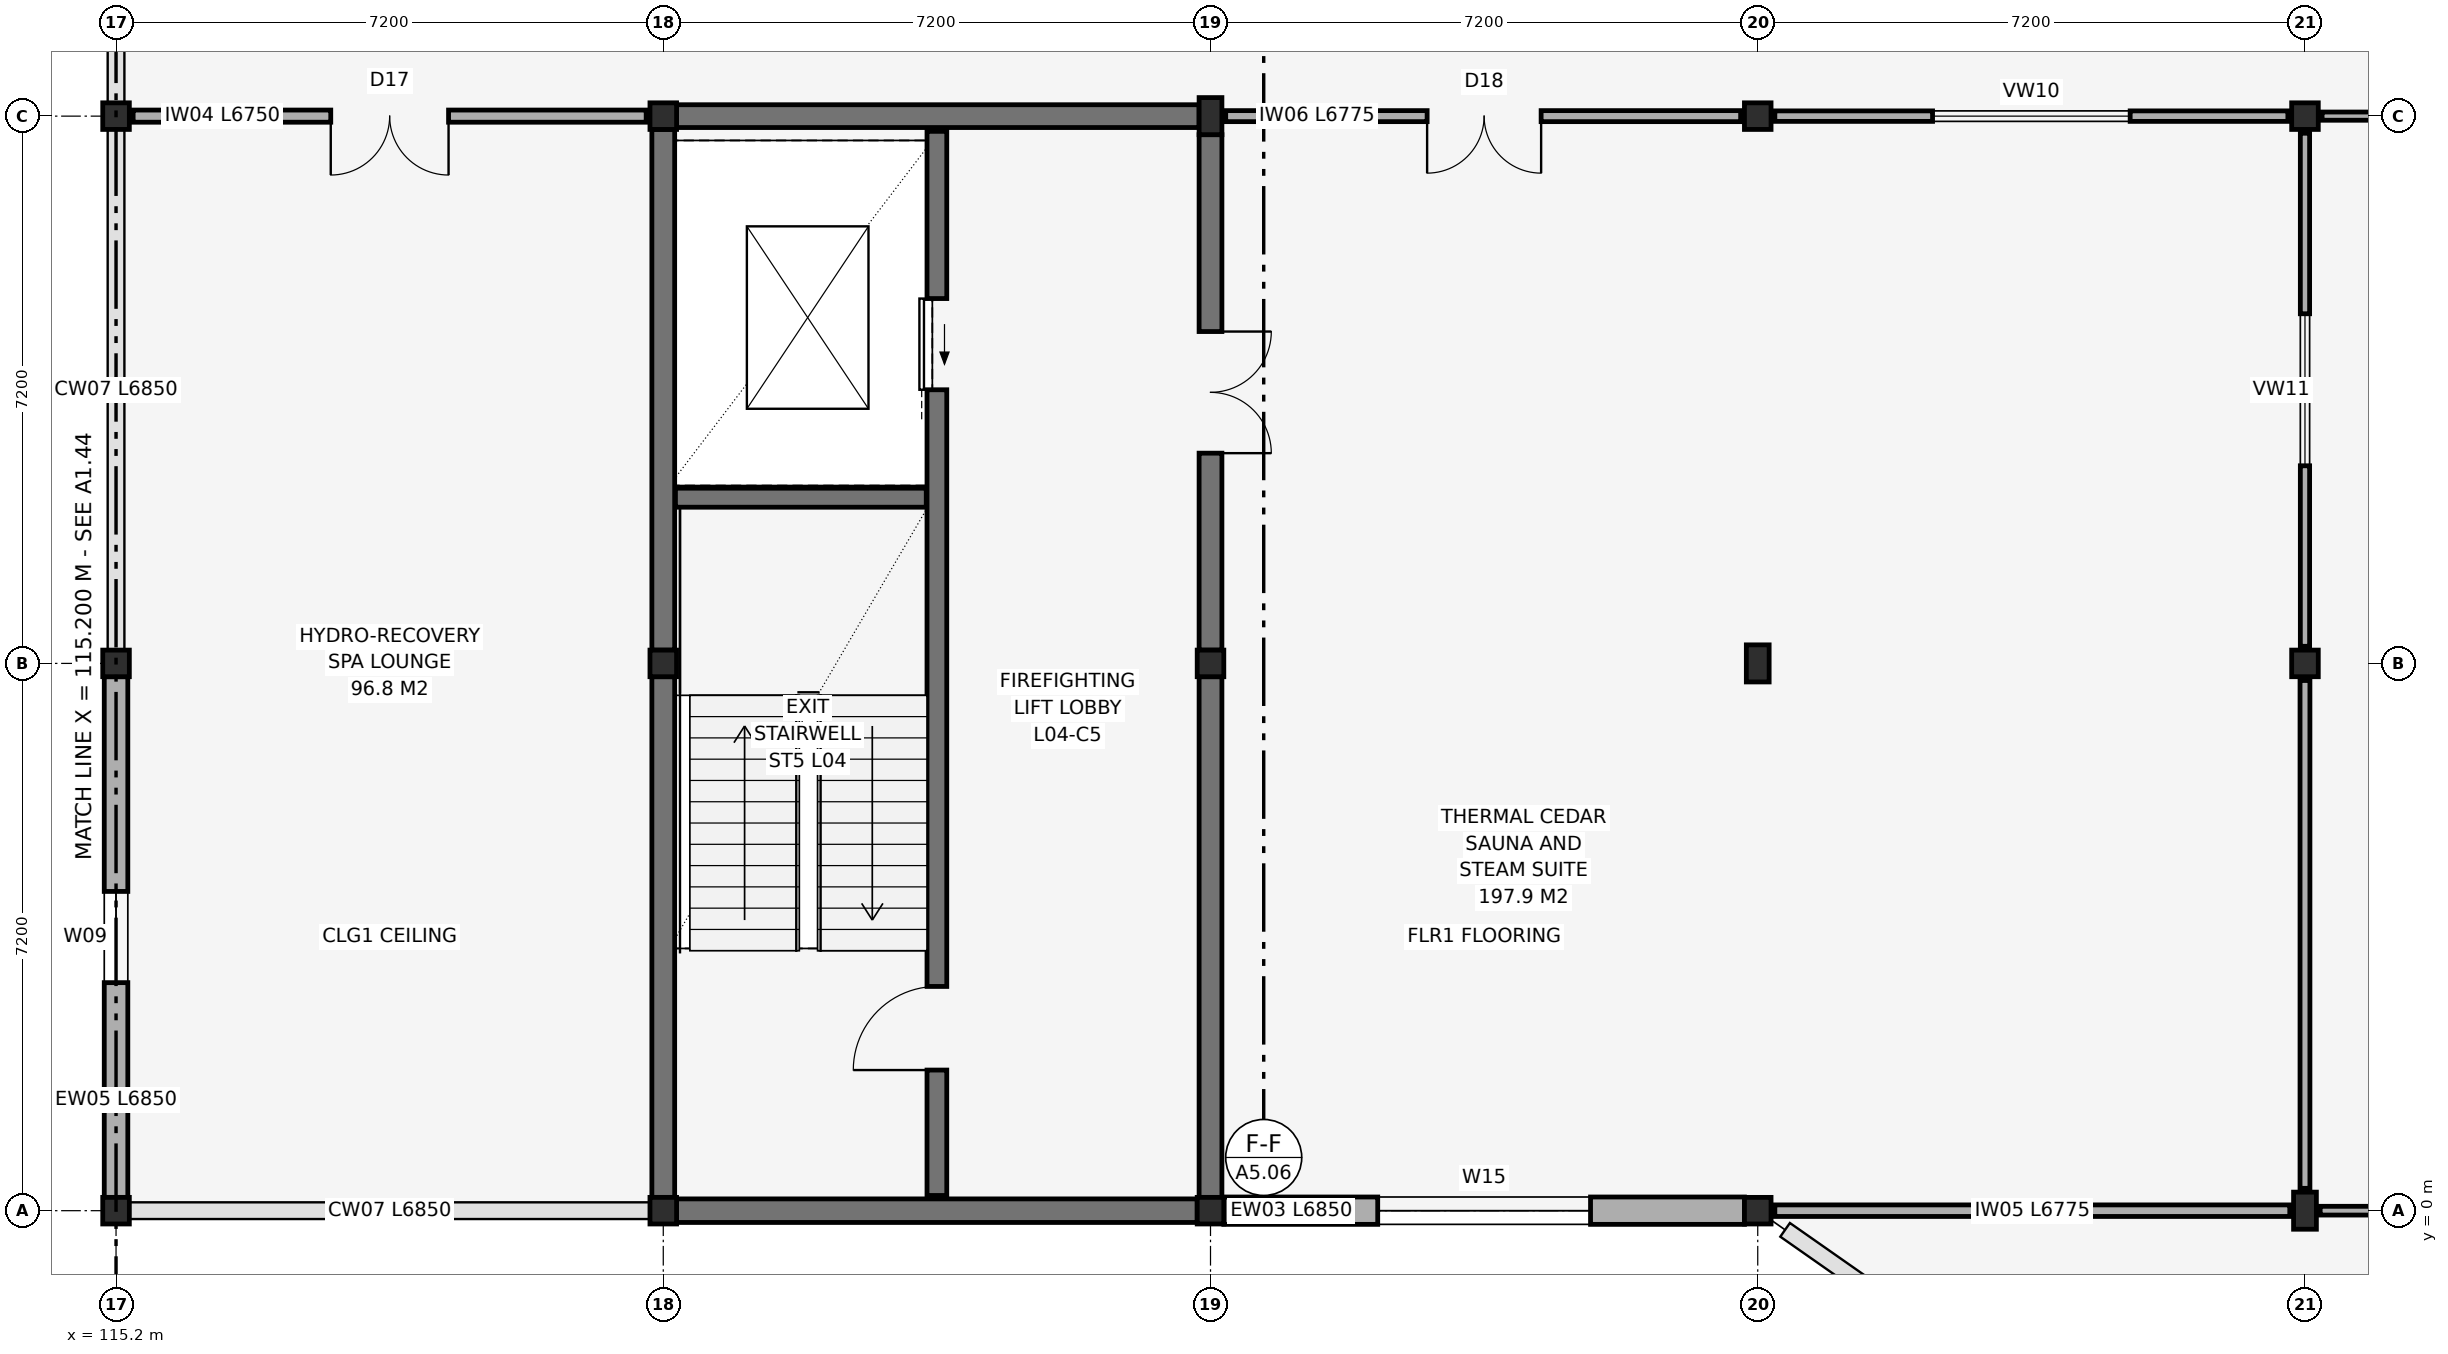
"""IFC4 building model, lengths in metres.
Left out: names, types, materials, properties, quantities, classifications, styles, units other than length and angle.
Written with IfcOpenShell. Run it as: python <this file> out.ifc"""

import sys

from ifc_helpers import new_model, si_unit, direction, frame, frame_2d, origin, origin_2d, place, context, subcontext, project, spatial, rectangle, i_section, extrude, element, fill, save


model = new_model("IFC4")
c1 = context("Model", 3, precision=1e-05, world=origin(), true_north=direction((0.0, 1.0)))
c2 = subcontext(c1, "Body", "Model", "MODEL_VIEW")
j1 = project(units=[si_unit("LENGTHUNIT", "METRE"), si_unit("PLANEANGLEUNIT", "RADIAN")], contexts=[c1])
p1 = place(None, origin())
s1 = spatial("IfcSite", under=j1, at=p1, CompositionType="ELEMENT")
p2 = place(p1, origin())
s2 = spatial("IfcBuilding", under=s1, at=p2, CompositionType="ELEMENT")
p3 = place(p2, frame((0.0, 0.0, 19.2)))
s3 = spatial("IfcBuildingStorey", under=s2, at=p3, CompositionType="ELEMENT", Elevation=19.2)
for number, where, z_axis, x_axis in (
    (1, (115.2, 0.0, 0.0), (0.0, 0.0, 1.0), (1.0, 0.0, 0.0)),
    (2, (115.2, 7.2, 0.0), (0.0, 0.0, 1.0), (1.0, 0.0, 0.0)),
    (3, (115.2, 14.4, 0.0), (0.0, 0.0, 1.0), (1.0, 0.0, 0.0)),
    (4, (122.4, 0.0, 0.0), (0.0, 0.0, 1.0), (1.0, 0.0, 0.0)),
    (5, (122.4, 7.2, 0.0), (0.0, 0.0, 1.0), (1.0, 0.0, 0.0)),
    (6, (122.4, 14.4, 0.0), (0.0, 0.0, 1.0), (1.0, 0.0, 0.0)),
    (7, (129.6, 0.0, 0.0), (0.0, 0.0, 1.0), (1.0, 0.0, 0.0)),
    (8, (129.6, 7.2, 0.0), (0.0, 0.0, 1.0), (1.0, 0.0, 0.0)),
):
    element("IfcColumn", number, at=place(p3, frame(where, z_axis=z_axis, x_axis=x_axis)), inside=s3, PredefinedType="COLUMN", context=c2, shape_type="SweptSolid", body=[
        extrude(i_section(OverallWidth=0.35, OverallDepth=0.35, WebThickness=0.012, FlangeThickness=0.019, FilletRadius=0.02, at=origin_2d()), origin(), (0.0, 0.0, 1.0), 4.2),
    ])
p4 = place(p3, frame((129.6, 14.4, 0.0), z_axis=(0.0, 0.0, 1.0), x_axis=(1.0, 0.0, 0.0)))
e9 = element("IfcColumn", 9, at=p4, inside=s3, PredefinedType="COLUMN", context=c2, shape_type="SweptSolid", body=[
    extrude(i_section(OverallWidth=0.3, OverallDepth=0.488, WebThickness=0.011, FlangeThickness=0.018, FilletRadius=0.026, at=origin_2d()), origin(), (0.0, 0.0, 1.0), 4.2),
])
p5 = place(p3, frame((136.8, 0.0, 0.0), z_axis=(0.0, 0.0, 1.0), x_axis=(1.0, 0.0, 0.0)))
e10 = element("IfcColumn", 10, at=p5, inside=s3, PredefinedType="COLUMN", context=c2, shape_type="SweptSolid", body=[
    extrude(i_section(OverallWidth=0.35, OverallDepth=0.35, WebThickness=0.012, FlangeThickness=0.019, FilletRadius=0.02, at=origin_2d()), origin(), (0.0, 0.0, 1.0), 4.2),
])
p6 = place(p3, frame((136.8, 7.2, 0.0), z_axis=(0.0, 0.0, 1.0), x_axis=(1.0, 0.0, 0.0)))
e11 = element("IfcColumn", 11, at=p6, inside=s3, PredefinedType="COLUMN", context=c2, shape_type="SweptSolid", body=[
    extrude(i_section(OverallWidth=0.3, OverallDepth=0.488, WebThickness=0.011, FlangeThickness=0.018, FilletRadius=0.026, at=origin_2d()), origin(), (0.0, 0.0, 1.0), 4.2),
])
p7 = place(p3, frame((136.8, 14.4, 0.0), z_axis=(0.0, 0.0, 1.0), x_axis=(1.0, 0.0, 0.0)))
e12 = element("IfcColumn", 12, at=p7, inside=s3, PredefinedType="COLUMN", context=c2, shape_type="SweptSolid", body=[
    extrude(i_section(OverallWidth=0.35, OverallDepth=0.35, WebThickness=0.012, FlangeThickness=0.019, FilletRadius=0.02, at=origin_2d()), origin(), (0.0, 0.0, 1.0), 4.2),
])
p8 = place(p3, frame((144.0, 0.0, 0.0), z_axis=(0.0, 0.0, 1.0), x_axis=(1.0, 0.0, 0.0)))
e13 = element("IfcColumn", 13, at=p8, inside=s3, PredefinedType="COLUMN", context=c2, shape_type="SweptSolid", body=[
    extrude(i_section(OverallWidth=0.3, OverallDepth=0.488, WebThickness=0.011, FlangeThickness=0.018, FilletRadius=0.026, at=origin_2d()), origin(), (0.0, 0.0, 1.0), 4.2),
])
for number, where, z_axis, x_axis in (
    (14, (144.0, 7.2, 0.0), (0.0, 0.0, 1.0), (1.0, 0.0, 0.0)),
    (15, (144.0, 14.4, 0.0), (0.0, 0.0, 1.0), (1.0, 0.0, 0.0)),
):
    element("IfcColumn", number, at=place(p3, frame(where, z_axis=z_axis, x_axis=x_axis)), inside=s3, PredefinedType="COLUMN", context=c2, shape_type="SweptSolid", body=[
        extrude(i_section(OverallWidth=0.35, OverallDepth=0.35, WebThickness=0.012, FlangeThickness=0.019, FilletRadius=0.02, at=origin_2d()), origin(), (0.0, 0.0, 1.0), 4.2),
    ])
p9 = place(p3, frame((129.775, 0.0, 0.0), z_axis=(0.0, 0.0, 1.0), x_axis=(1.0, 0.0, 0.0)))
e16 = element("IfcWall", 16, at=p9, inside=s3, PredefinedType="SOLIDWALL", context=c2, shape_type="SweptSolid", body=[
    extrude(rectangle(XDim=6.85, YDim=0.36, at=frame_2d((3.425, 0.0))), origin(), (0.0, 0.0, 1.0), 3.18),
])
p10 = place(p9, frame((2.025, 0.0, 0.95)))
e17 = element("IfcOpeningElement", 17, at=p10, cuts=e16, PredefinedType="OPENING", context=c2, shape_type="SweptSolid", body=[
    extrude(rectangle(XDim=2.8, YDim=1.5, at=frame_2d((1.4, 0.75))), frame((0.0, 0.195, 0.0), z_axis=(0.0, -1.0, 0.0), x_axis=(1.0, 0.0, 0.0)), (0.0, 0.0, 1.0), 0.39),
])
p11 = place(p3, frame((115.2, 0.175, 0.0), z_axis=(0.0, 0.0, 1.0), x_axis=(0.0, 1.0, 0.0)))
e18 = element("IfcWall", 18, at=p11, inside=s3, PredefinedType="SOLIDWALL", context=c2, shape_type="SweptSolid", body=[
    extrude(rectangle(XDim=6.85, YDim=0.31, at=frame_2d((3.425, 0.0))), origin(), (0.0, 0.0, 1.0), 3.64),
])
p12 = place(p11, frame((2.825, 0.0, 0.95)))
e19 = element("IfcOpeningElement", 19, at=p12, cuts=e18, PredefinedType="OPENING", context=c2, shape_type="SweptSolid", body=[
    extrude(rectangle(XDim=1.2, YDim=2.0, at=frame_2d((0.6, 1.0))), frame((0.0, 0.17, 0.0), z_axis=(0.0, -1.0, 0.0), x_axis=(1.0, 0.0, 0.0)), (0.0, 0.0, 1.0), 0.34),
])
p13 = place(p3, frame((122.575, 0.0, 0.0), z_axis=(0.0, 0.0, 1.0), x_axis=(1.0, 0.0, 0.0)))
e20 = element("IfcWall", 20, at=p13, inside=s3, PredefinedType="SHEAR", context=c2, shape_type="SweptSolid", body=[
    extrude(rectangle(XDim=6.85, YDim=0.31, at=frame_2d((3.425, 0.0))), origin(), (0.0, 0.0, 1.0), 3.98),
])
p14 = place(p3, frame((122.575, 14.4, 0.0), z_axis=(0.0, 0.0, 1.0), x_axis=(1.0, 0.0, 0.0)))
e21 = element("IfcWall", 21, at=p14, inside=s3, PredefinedType="SHEAR", context=c2, shape_type="SweptSolid", body=[
    extrude(rectangle(XDim=6.875, YDim=0.3, at=frame_2d((3.438, 0.0))), origin(), (0.0, 0.0, 1.0), 3.98),
])
p15 = place(p3, frame((122.4, 0.175, 0.0), z_axis=(0.0, 0.0, 1.0), x_axis=(0.0, 1.0, 0.0)))
e22 = element("IfcWall", 22, at=p15, inside=s3, PredefinedType="SHEAR", context=c2, shape_type="SweptSolid", body=[
    extrude(rectangle(XDim=6.85, YDim=0.3, at=frame_2d((3.425, 0.0))), origin(), (0.0, 0.0, 1.0), 3.98),
])
p16 = place(p3, frame((122.4, 7.375, 0.0), z_axis=(0.0, 0.0, 1.0), x_axis=(0.0, 1.0, 0.0)))
e23 = element("IfcWall", 23, at=p16, inside=s3, PredefinedType="SHEAR", context=c2, shape_type="SweptSolid", body=[
    extrude(rectangle(XDim=6.85, YDim=0.3, at=frame_2d((3.425, 0.0))), origin(), (0.0, 0.0, 1.0), 3.98),
])
p17 = place(p3, frame((129.6, 0.175, 0.0), z_axis=(0.0, 0.0, 1.0), x_axis=(0.0, 1.0, 0.0)))
e24 = element("IfcWall", 24, at=p17, inside=s3, PredefinedType="SHEAR", context=c2, shape_type="SweptSolid", body=[
    extrude(rectangle(XDim=6.85, YDim=0.3, at=frame_2d((3.425, 0.0))), origin(), (0.0, 0.0, 1.0), 3.98),
])
p18 = place(p3, frame((129.6, 7.375, 0.0), z_axis=(0.0, 0.0, 1.0), x_axis=(0.0, 1.0, 0.0)))
e25 = element("IfcWall", 25, at=p18, inside=s3, PredefinedType="SHEAR", context=c2, shape_type="SweptSolid", body=[
    extrude(rectangle(XDim=6.781, YDim=0.3, at=frame_2d((3.391, 0.0))), origin(), (0.0, 0.0, 1.0), 3.98),
])
p19 = place(p18, frame((2.591, 0.0, 0.0)))
e26 = element("IfcOpeningElement", 26, at=p19, cuts=e25, PredefinedType="OPENING", context=c2, shape_type="SweptSolid", body=[
    extrude(rectangle(XDim=1.6, YDim=2.2, at=frame_2d((0.8, 1.1))), frame((0.0, 0.165, 0.0), z_axis=(0.0, -1.0, 0.0), x_axis=(1.0, 0.0, 0.0)), (0.0, 0.0, 1.0), 0.33),
])
p20 = place(p3, frame((126.0, 0.2, 0.0), z_axis=(0.0, 0.0, 1.0), x_axis=(0.0, 1.0, 0.0)))
e27 = element("IfcWall", 27, at=p20, inside=s3, PredefinedType="SHEAR", context=c2, shape_type="SweptSolid", body=[
    extrude(rectangle(XDim=14.0, YDim=0.26, at=frame_2d((7.0, 0.0))), origin(), (0.0, 0.0, 1.0), 3.98),
])
p21 = place(p20, frame((1.65, 0.0, 0.0)))
e28 = element("IfcOpeningElement", 28, at=p21, cuts=e27, PredefinedType="OPENING", context=c2, shape_type="SweptSolid", body=[
    extrude(rectangle(XDim=1.1, YDim=2.15, at=frame_2d((0.55, 1.075))), frame((0.0, 0.145, 0.0), z_axis=(0.0, -1.0, 0.0), x_axis=(1.0, 0.0, 0.0)), (0.0, 0.0, 1.0), 0.29),
])
p22 = place(p20, frame((10.6, 0.0, 0.0)))
e29 = element("IfcOpeningElement", 29, at=p22, cuts=e27, PredefinedType="OPENING", context=c2, shape_type="SweptSolid", body=[
    extrude(rectangle(XDim=1.2, YDim=2.25, at=frame_2d((0.6, 1.125))), frame((0.0, 0.145, 0.0), z_axis=(0.0, -1.0, 0.0), x_axis=(1.0, 0.0, 0.0)), (0.0, 0.0, 1.0), 0.29),
])
p23 = place(p3, frame((122.56, 9.38, 0.0), z_axis=(0.0, 0.0, 1.0), x_axis=(1.0, 0.0, 0.0)))
e30 = element("IfcWall", 30, at=p23, inside=s3, PredefinedType="SHEAR", context=c2, shape_type="SweptSolid", body=[
    extrude(rectangle(XDim=3.3, YDim=0.25, at=frame_2d((1.65, 0.0))), origin(), (0.0, 0.0, 1.0), 3.98),
])
p24 = place(p3, frame((115.425, 14.4, 0.0), z_axis=(0.0, 0.0, 1.0), x_axis=(1.0, 0.0, 0.0)))
e31 = element("IfcWall", 31, at=p24, inside=s3, PredefinedType="PARTITIONING", context=c2, shape_type="SweptSolid", body=[
    extrude(rectangle(XDim=6.75, YDim=0.16, at=frame_2d((3.375, 0.0))), origin(), (0.0, 0.0, 1.0), 3.64),
])
p25 = place(p24, frame((2.6, 0.0, 0.0)))
e32 = element("IfcOpeningElement", 32, at=p25, cuts=e31, PredefinedType="OPENING", context=c2, shape_type="SweptSolid", body=[
    extrude(rectangle(XDim=1.55, YDim=2.2, at=frame_2d((0.775, 1.1))), frame((0.0, 0.095, 0.0), z_axis=(0.0, -1.0, 0.0), x_axis=(1.0, 0.0, 0.0)), (0.0, 0.0, 1.0), 0.19),
])
p26 = place(p3, frame((137.025, 0.0, 0.0), z_axis=(0.0, 0.0, 1.0), x_axis=(1.0, 0.0, 0.0)))
e33 = element("IfcWall", 33, at=p26, inside=s3, PredefinedType="PARTITIONING", context=c2, shape_type="SweptSolid", body=[
    extrude(rectangle(XDim=6.775, YDim=0.152, at=frame_2d((3.388, 0.0))), origin(), (0.0, 0.0, 1.0), 3.18),
])
p27 = place(p3, frame((129.8, 14.4, 0.0), z_axis=(0.0, 0.0, 1.0), x_axis=(1.0, 0.0, 0.0)))
e34 = element("IfcWall", 34, at=p27, inside=s3, PredefinedType="PARTITIONING", context=c2, shape_type="SweptSolid", body=[
    extrude(rectangle(XDim=6.775, YDim=0.145, at=frame_2d((3.387, 0.0))), origin(), (0.0, 0.0, 1.0), 3.64),
])
p28 = place(p27, frame((2.65, 0.0, 0.0)))
e35 = element("IfcOpeningElement", 35, at=p28, cuts=e34, PredefinedType="OPENING", context=c2, shape_type="SweptSolid", body=[
    extrude(rectangle(XDim=1.5, YDim=2.2, at=frame_2d((0.75, 1.1))), frame((0.0, 0.087, 0.0), z_axis=(0.0, -1.0, 0.0), x_axis=(1.0, 0.0, 0.0)), (0.0, 0.0, 1.0), 0.175),
])
p29 = place(p3, frame((137.025, 14.4, 0.0), z_axis=(0.0, 0.0, 1.0), x_axis=(1.0, 0.0, 0.0)))
e36 = element("IfcWall", 36, at=p29, inside=s3, PredefinedType="PARTITIONING", context=c2, shape_type="SweptSolid", body=[
    extrude(rectangle(XDim=6.75, YDim=0.138, at=frame_2d((3.375, 0.0))), origin(), (0.0, 0.0, 1.0), 3.64),
])
p30 = place(p29, frame((2.075, 0.0, 0.95)))
e37 = element("IfcOpeningElement", 37, at=p30, cuts=e36, PredefinedType="OPENING", context=c2, shape_type="SweptSolid", body=[
    extrude(rectangle(XDim=2.6, YDim=1.2, at=frame_2d((1.3, 0.6))), frame((0.0, 0.084, 0.0), z_axis=(0.0, -1.0, 0.0), x_axis=(1.0, 0.0, 0.0)), (0.0, 0.0, 1.0), 0.168),
])
p31 = place(p3, frame((144.0, 0.294, 0.0), z_axis=(0.0, 0.0, 1.0), x_axis=(0.0, 1.0, 0.0)))
e38 = element("IfcWall", 38, at=p31, inside=s3, PredefinedType="PARTITIONING", context=c2, shape_type="SweptSolid", body=[
    extrude(rectangle(XDim=6.681, YDim=0.13, at=frame_2d((3.341, 0.0))), origin(), (0.0, 0.0, 1.0), 3.18),
])
p32 = place(p3, frame((144.0, 7.425, 0.0), z_axis=(0.0, 0.0, 1.0), x_axis=(0.0, 1.0, 0.0)))
e39 = element("IfcWall", 39, at=p32, inside=s3, PredefinedType="PARTITIONING", context=c2, shape_type="SweptSolid", body=[
    extrude(rectangle(XDim=6.75, YDim=0.122, at=frame_2d((3.375, 0.0))), origin(), (0.0, 0.0, 1.0), 3.64),
])
p33 = place(p32, frame((2.375, 0.0, 0.95)))
e40 = element("IfcOpeningElement", 40, at=p33, cuts=e39, PredefinedType="OPENING", context=c2, shape_type="SweptSolid", body=[
    extrude(rectangle(XDim=2.0, YDim=1.2, at=frame_2d((1.0, 0.6))), frame((0.0, 0.076, 0.0), z_axis=(0.0, -1.0, 0.0), x_axis=(1.0, 0.0, 0.0)), (0.0, 0.0, 1.0), 0.152),
])
p34 = place(p3, frame((144.2, 0.0, 0.0), z_axis=(0.0, 0.0, 1.0), x_axis=(1.0, 0.0, 0.0)))
e41 = element("IfcWall", 41, at=p34, inside=s3, PredefinedType="PARTITIONING", context=c2, shape_type="SweptSolid", body=[
    extrude(rectangle(XDim=6.775, YDim=0.115, at=frame_2d((3.388, 0.0))), origin(), (0.0, 0.0, 1.0), 3.18),
])
p35 = place(p3, frame((144.225, 14.4, 0.0), z_axis=(0.0, 0.0, 1.0), x_axis=(1.0, 0.0, 0.0)))
e42 = element("IfcWall", 42, at=p35, inside=s3, PredefinedType="PARTITIONING", context=c2, shape_type="SweptSolid", body=[
    extrude(rectangle(XDim=6.75, YDim=0.108, at=frame_2d((3.375, 0.0))), origin(), (0.0, 0.0, 1.0), 3.64),
])
p36 = place(p35, frame((2.865, 0.0, 0.0)))
e43 = element("IfcOpeningElement", 43, at=p36, cuts=e42, PredefinedType="OPENING", context=c2, shape_type="SweptSolid", body=[
    extrude(rectangle(XDim=1.02, YDim=2.15, at=frame_2d((0.51, 1.075))), frame((0.0, 0.069, 0.0), z_axis=(0.0, -1.0, 0.0), x_axis=(1.0, 0.0, 0.0)), (0.0, 0.0, 1.0), 0.138),
])
p37 = place(p10, origin())
e44 = element("IfcWindow", 44, at=p37, inside=s3, PartitioningType="SINGLE_PANEL", PredefinedType="WINDOW", context=c2, shape_type="SweptSolid", body=[
    extrude(rectangle(XDim=2.8, YDim=1.5, at=frame_2d((1.4, 0.75))), frame((0.0, 0.03, 0.0), z_axis=(0.0, -1.0, 0.0), x_axis=(1.0, 0.0, 0.0)), (0.0, 0.0, 1.0), 0.06),
])
fill(e17, e44)
p38 = place(p12, origin())
e45 = element("IfcWindow", 45, at=p38, inside=s3, PartitioningType="SINGLE_PANEL", PredefinedType="WINDOW", context=c2, shape_type="SweptSolid", body=[
    extrude(rectangle(XDim=1.2, YDim=2.0, at=frame_2d((0.6, 1.0))), frame((0.0, 0.03, 0.0), z_axis=(0.0, -1.0, 0.0), x_axis=(1.0, 0.0, 0.0)), (0.0, 0.0, 1.0), 0.06),
])
fill(e19, e45)
p39 = place(p21, origin())
e46 = element("IfcDoor", 46, at=p39, inside=s3, OperationType="SINGLE_SWING_LEFT", PredefinedType="DOOR", context=c2, shape_type="SweptSolid", body=[
    extrude(rectangle(XDim=1.1, YDim=2.15, at=frame_2d((0.55, 1.075))), frame((0.0, 0.025, 0.0), z_axis=(0.0, -1.0, 0.0), x_axis=(1.0, 0.0, 0.0)), (0.0, 0.0, 1.0), 0.05),
])
fill(e28, e46)
p40 = place(p22, frame((1.2, 0.0, 0.0), z_axis=(0.0, 0.0, 1.0), x_axis=(-1.0, 0.0, 0.0)))
e47 = element("IfcDoor", 47, at=p40, inside=s3, OperationType="SLIDING_TO_LEFT", PredefinedType="DOOR", context=c2, shape_type="SweptSolid", body=[
    extrude(rectangle(XDim=1.2, YDim=2.25, at=frame_2d((0.6, 1.125))), frame((0.0, 0.025, 0.0), z_axis=(0.0, -1.0, 0.0), x_axis=(1.0, 0.0, 0.0)), (0.0, 0.0, 1.0), 0.05),
])
fill(e29, e47)
p41 = place(p19, frame((1.6, 0.0, 0.0), z_axis=(0.0, 0.0, 1.0), x_axis=(-1.0, 0.0, 0.0)))
e48 = element("IfcDoor", 48, at=p41, inside=s3, OperationType="DOUBLE_SWING_LEFT", PredefinedType="DOOR", context=c2, shape_type="SweptSolid", body=[
    extrude(rectangle(XDim=1.6, YDim=2.2, at=frame_2d((0.8, 1.1))), frame((0.0, 0.025, 0.0), z_axis=(0.0, -1.0, 0.0), x_axis=(1.0, 0.0, 0.0)), (0.0, 0.0, 1.0), 0.05),
])
fill(e26, e48)
p42 = place(p25, frame((1.55, 0.0, 0.0), z_axis=(0.0, 0.0, 1.0), x_axis=(-1.0, 0.0, 0.0)))
e49 = element("IfcDoor", 49, at=p42, inside=s3, OperationType="DOUBLE_SWING_LEFT", PredefinedType="DOOR", context=c2, shape_type="SweptSolid", body=[
    extrude(rectangle(XDim=1.55, YDim=2.2, at=frame_2d((0.775, 1.1))), frame((0.0, 0.025, 0.0), z_axis=(0.0, -1.0, 0.0), x_axis=(1.0, 0.0, 0.0)), (0.0, 0.0, 1.0), 0.05),
])
fill(e32, e49)
p43 = place(p28, frame((1.5, 0.0, 0.0), z_axis=(0.0, 0.0, 1.0), x_axis=(-1.0, 0.0, 0.0)))
e50 = element("IfcDoor", 50, at=p43, inside=s3, OperationType="DOUBLE_SWING_LEFT", PredefinedType="DOOR", context=c2, shape_type="SweptSolid", body=[
    extrude(rectangle(XDim=1.5, YDim=2.2, at=frame_2d((0.75, 1.1))), frame((0.0, 0.025, 0.0), z_axis=(0.0, -1.0, 0.0), x_axis=(1.0, 0.0, 0.0)), (0.0, 0.0, 1.0), 0.05),
])
fill(e35, e50)
p44 = place(p30, origin())
e51 = element("IfcWindow", 51, at=p44, inside=s3, PartitioningType="SINGLE_PANEL", PredefinedType="WINDOW", context=c2, shape_type="SweptSolid", body=[
    extrude(rectangle(XDim=2.6, YDim=1.2, at=frame_2d((1.3, 0.6))), frame((0.0, 0.03, 0.0), z_axis=(0.0, -1.0, 0.0), x_axis=(1.0, 0.0, 0.0)), (0.0, 0.0, 1.0), 0.06),
])
fill(e37, e51)
p45 = place(p33, origin())
e52 = element("IfcWindow", 52, at=p45, inside=s3, PartitioningType="SINGLE_PANEL", PredefinedType="WINDOW", context=c2, shape_type="SweptSolid", body=[
    extrude(rectangle(XDim=2.0, YDim=1.2, at=frame_2d((1.0, 0.6))), frame((0.0, 0.03, 0.0), z_axis=(0.0, -1.0, 0.0), x_axis=(1.0, 0.0, 0.0)), (0.0, 0.0, 1.0), 0.06),
])
fill(e40, e52)
save(model, sys.argv[1])
